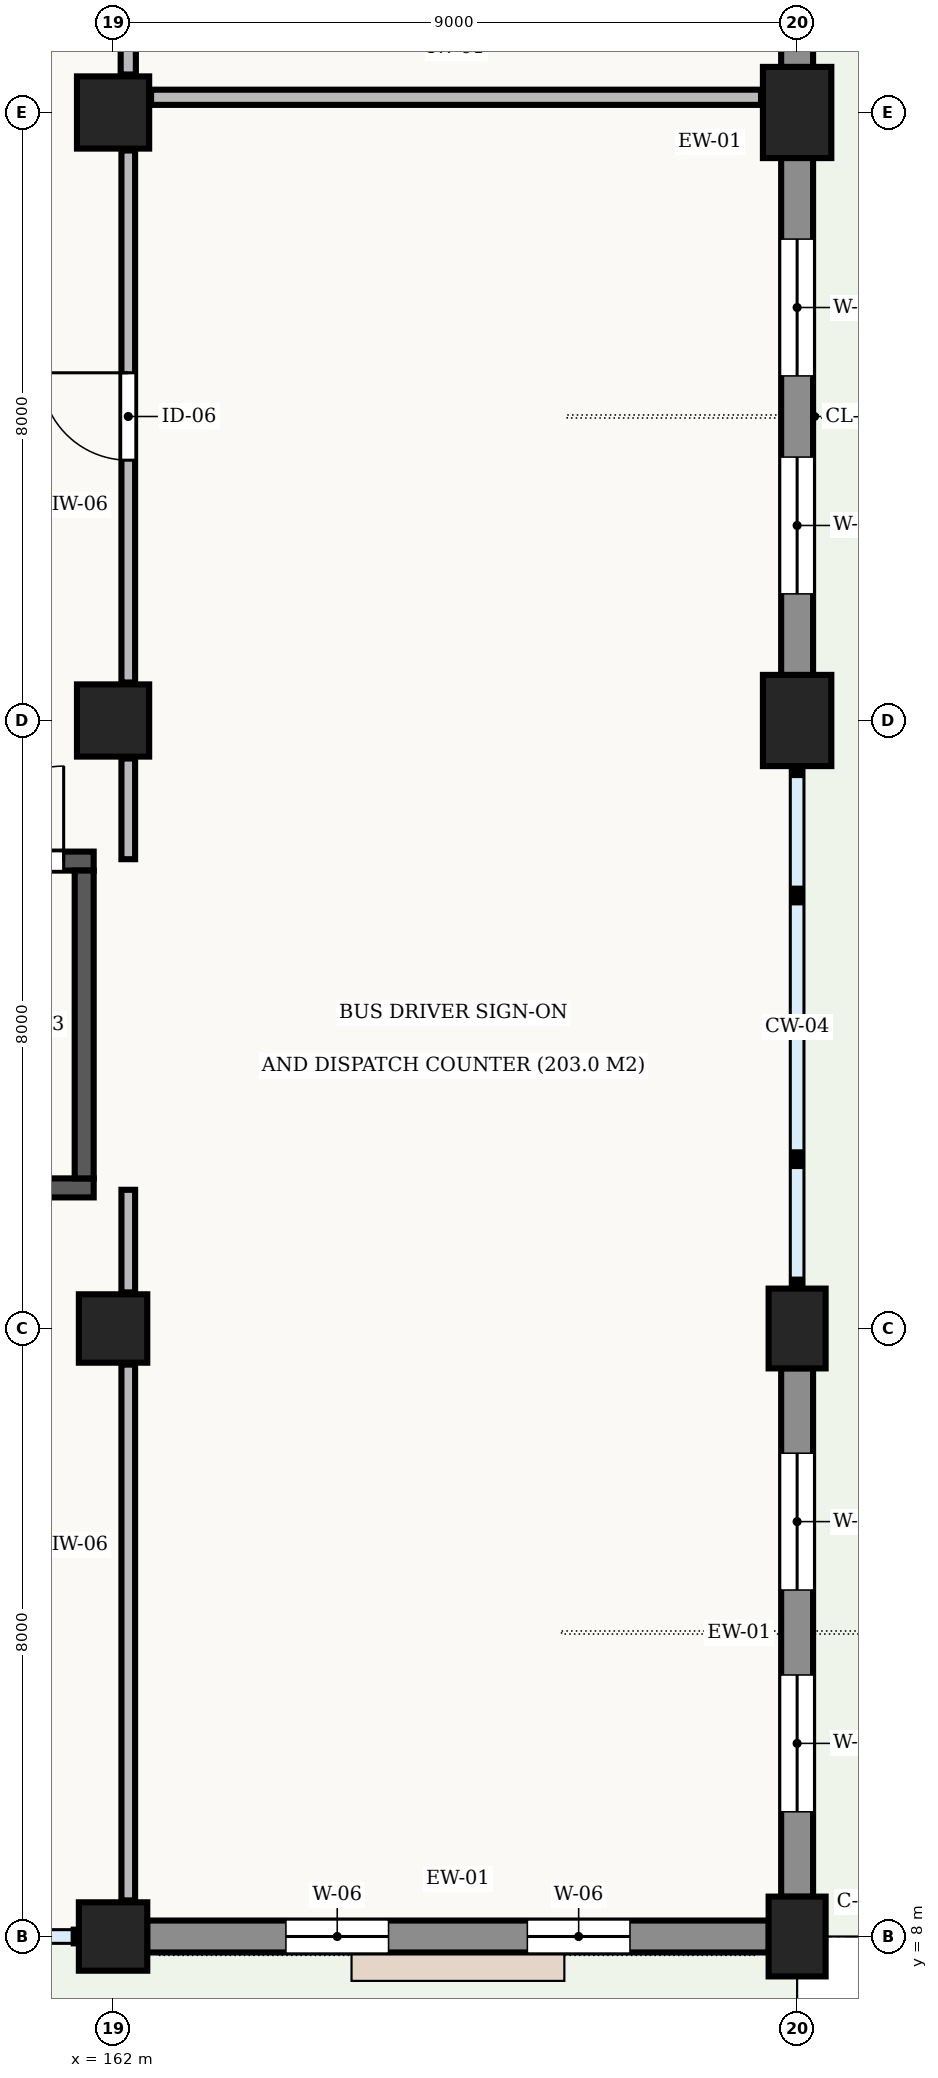
"""IFC4 building model, lengths in metres.
Left out: names, types, materials, properties, quantities, classifications, styles, units other than length and angle.
Written with IfcOpenShell. Run it as: python <this file> out.ifc"""

import sys

from ifc_helpers import new_model, si_unit, direction, frame, frame_2d, origin, origin_2d, place, context, subcontext, project, spatial, rectangle, extrude, element, fill, save


model = new_model("IFC4")
c1 = context("Model", 3, precision=1e-05, world=origin(), true_north=direction((0.0, 1.0)))
c2 = subcontext(c1, "Body", "Model", "MODEL_VIEW")
j1 = project(units=[si_unit("LENGTHUNIT", "METRE"), si_unit("PLANEANGLEUNIT", "RADIAN")], contexts=[c1])
p1 = place(None, origin())
s1 = spatial("IfcSite", under=j1, at=p1, CompositionType="ELEMENT")
p2 = place(p1, origin())
s2 = spatial("IfcBuilding", under=s1, at=p2, CompositionType="ELEMENT")
p3 = place(p2, origin())
s3 = spatial("IfcBuildingStorey", under=s2, at=p3, CompositionType="ELEMENT", Elevation=0.0)
for number, where, z_axis, x_axis in (
    (1, (162.0, 8.0, -0.42), (0.0, 0.0, 1.0), (1.0, 0.0, 0.0)),
    (2, (162.0, 16.0, -0.42), (0.0, 0.0, 1.0), (1.0, 0.0, 0.0)),
):
    element("IfcColumn", number, at=place(p3, frame(where, z_axis=z_axis, x_axis=x_axis)), inside=s3, PredefinedType="COLUMN", context=c2, shape_type="SweptSolid", body=[
        extrude(rectangle(XDim=0.9, YDim=0.9, at=origin_2d()), origin(), (0.0, 0.0, 1.0), 5.82),
    ])
for number, where, z_axis, x_axis in (
    (3, (162.0, 24.0, -0.42), (0.0, 0.0, 1.0), (1.0, 0.0, 0.0)),
    (4, (162.0, 32.0, -0.42), (0.0, 0.0, 1.0), (1.0, 0.0, 0.0)),
):
    element("IfcColumn", number, at=place(p3, frame(where, z_axis=z_axis, x_axis=x_axis)), inside=s3, PredefinedType="COLUMN", context=c2, shape_type="SweptSolid", body=[
        extrude(rectangle(XDim=0.95, YDim=0.95, at=origin_2d()), origin(), (0.0, 0.0, 1.0), 5.82),
    ])
for number, where, z_axis, x_axis in (
    (5, (171.0, 8.0, -0.42), (0.0, 0.0, 1.0), (1.0, 0.0, 0.0)),
    (6, (171.0, 16.0, -0.42), (0.0, 0.0, 1.0), (1.0, 0.0, 0.0)),
):
    element("IfcColumn", number, at=place(p3, frame(where, z_axis=z_axis, x_axis=x_axis)), inside=s3, PredefinedType="COLUMN", context=c2, shape_type="SweptSolid", body=[
        extrude(rectangle(XDim=0.75, YDim=1.05, at=origin_2d()), origin(), (0.0, 0.0, 1.0), 5.82),
    ])
for number, where, z_axis, x_axis in (
    (7, (171.0, 24.0, -0.42), (0.0, 0.0, 1.0), (1.0, 0.0, 0.0)),
    (8, (171.0, 32.0, -0.42), (0.0, 0.0, 1.0), (1.0, 0.0, 0.0)),
):
    element("IfcColumn", number, at=place(p3, frame(where, z_axis=z_axis, x_axis=x_axis)), inside=s3, PredefinedType="COLUMN", context=c2, shape_type="SweptSolid", body=[
        extrude(rectangle(XDim=0.9, YDim=1.2, at=origin_2d()), origin(), (0.0, 0.0, 1.0), 5.82),
    ])
p4 = place(p3, frame((171.0, 39.402, 0.0), z_axis=(0.0, 0.0, 1.0), x_axis=(0.0, -1.0, 0.0)))
e9 = element("IfcWall", 9, at=p4, inside=s3, PredefinedType="STANDARD", context=c2, shape_type="SweptSolid", body=[
    extrude(rectangle(XDim=6.804, YDim=0.42, at=frame_2d((3.402, 0.0))), origin(), (0.0, 0.0, 1.0), 4.38),
])
p5 = place(p4, frame((2.852, 0.0, 0.0)))
e10 = element("IfcOpeningElement", 10, at=p5, cuts=e9, PredefinedType="OPENING", context=c2, shape_type="SweptSolid", body=[
    extrude(rectangle(XDim=1.1, YDim=2.2, at=frame_2d((0.55, 1.1))), frame((0.0, 0.222, 0.0), z_axis=(0.0, -1.0, 0.0), x_axis=(1.0, 0.0, 0.0)), (0.0, 0.0, 1.0), 0.444),
])
p6 = place(p3, frame((171.0, 31.402, 0.0), z_axis=(0.0, 0.0, 1.0), x_axis=(0.0, -1.0, 0.0)))
e11 = element("IfcWall", 11, at=p6, inside=s3, PredefinedType="STANDARD", context=c2, shape_type="SweptSolid", body=[
    extrude(rectangle(XDim=6.804, YDim=0.42, at=frame_2d((3.402, 0.0))), origin(), (0.0, 0.0, 1.0), 4.38),
])
p7 = place(p6, frame((1.068, 0.0, 0.9)))
e12 = element("IfcOpeningElement", 12, at=p7, cuts=e11, PredefinedType="OPENING", context=c2, shape_type="SweptSolid", body=[
    extrude(rectangle(XDim=1.8, YDim=2.4, at=frame_2d((0.9, 1.2))), frame((0.0, 0.222, 0.0), z_axis=(0.0, -1.0, 0.0), x_axis=(1.0, 0.0, 0.0)), (0.0, 0.0, 1.0), 0.444),
])
p8 = place(p6, frame((3.936, 0.0, 0.9)))
e13 = element("IfcOpeningElement", 13, at=p8, cuts=e11, PredefinedType="OPENING", context=c2, shape_type="SweptSolid", body=[
    extrude(rectangle(XDim=1.8, YDim=2.4, at=frame_2d((0.9, 1.2))), frame((0.0, 0.222, 0.0), z_axis=(0.0, -1.0, 0.0), x_axis=(1.0, 0.0, 0.0)), (0.0, 0.0, 1.0), 0.444),
])
p9 = place(p3, frame((171.0, 15.477, 0.0), z_axis=(0.0, 0.0, 1.0), x_axis=(0.0, -1.0, 0.0)))
e14 = element("IfcWall", 14, at=p9, inside=s3, PredefinedType="STANDARD", context=c2, shape_type="SweptSolid", body=[
    extrude(rectangle(XDim=6.954, YDim=0.42, at=frame_2d((3.477, 0.0))), origin(), (0.0, 0.0, 1.0), 4.38),
])
p10 = place(p9, frame((1.118, 0.0, 0.9)))
e15 = element("IfcOpeningElement", 15, at=p10, cuts=e14, PredefinedType="OPENING", context=c2, shape_type="SweptSolid", body=[
    extrude(rectangle(XDim=1.8, YDim=2.4, at=frame_2d((0.9, 1.2))), frame((0.0, 0.222, 0.0), z_axis=(0.0, -1.0, 0.0), x_axis=(1.0, 0.0, 0.0)), (0.0, 0.0, 1.0), 0.444),
])
p11 = place(p9, frame((4.036, 0.0, 0.9)))
e16 = element("IfcOpeningElement", 16, at=p11, cuts=e14, PredefinedType="OPENING", context=c2, shape_type="SweptSolid", body=[
    extrude(rectangle(XDim=1.8, YDim=2.4, at=frame_2d((0.9, 1.2))), frame((0.0, 0.222, 0.0), z_axis=(0.0, -1.0, 0.0), x_axis=(1.0, 0.0, 0.0)), (0.0, 0.0, 1.0), 0.444),
])
p12 = place(p3, frame((170.627, 8.0, 0.0), z_axis=(0.0, 0.0, 1.0), x_axis=(-1.0, 0.0, 0.0)))
e17 = element("IfcWall", 17, at=p12, inside=s3, PredefinedType="STANDARD", context=c2, shape_type="SweptSolid", body=[
    extrude(rectangle(XDim=8.179, YDim=0.42, at=frame_2d((4.089, 0.0))), origin(), (0.0, 0.0, 1.0), 4.38),
])
p13 = place(p12, frame((1.826, 0.0, 0.9)))
e18 = element("IfcOpeningElement", 18, at=p13, cuts=e17, PredefinedType="OPENING", context=c2, shape_type="SweptSolid", body=[
    extrude(rectangle(XDim=1.35, YDim=2.0, at=frame_2d((0.675, 1.0))), frame((0.0, 0.222, 0.0), z_axis=(0.0, -1.0, 0.0), x_axis=(1.0, 0.0, 0.0)), (0.0, 0.0, 1.0), 0.444),
])
p14 = place(p12, frame((5.003, 0.0, 0.9)))
e19 = element("IfcOpeningElement", 19, at=p14, cuts=e17, PredefinedType="OPENING", context=c2, shape_type="SweptSolid", body=[
    extrude(rectangle(XDim=1.35, YDim=2.0, at=frame_2d((0.675, 1.0))), frame((0.0, 0.222, 0.0), z_axis=(0.0, -1.0, 0.0), x_axis=(1.0, 0.0, 0.0)), (0.0, 0.0, 1.0), 0.444),
])
p15 = place(p3, frame((153.255, 17.85, 0.0), z_axis=(0.0, 0.0, 1.0), x_axis=(1.0, 0.0, 0.0)))
e20 = element("IfcWall", 20, at=p15, inside=s3, PredefinedType="SHEAR", context=c2, shape_type="SweptSolid", body=[
    extrude(rectangle(XDim=8.49, YDim=0.25, at=frame_2d((4.245, 0.0))), origin(), (0.0, 0.0, 1.0), 5.05),
])
p16 = place(p3, frame((161.745, 22.15, 0.0), z_axis=(0.0, 0.0, 1.0), x_axis=(-1.0, 0.0, 0.0)))
e21 = element("IfcWall", 21, at=p16, inside=s3, PredefinedType="SHEAR", context=c2, shape_type="SweptSolid", body=[
    extrude(rectangle(XDim=8.49, YDim=0.25, at=frame_2d((4.245, 0.0))), origin(), (0.0, 0.0, 1.0), 5.05),
])
p17 = place(p16, frame((0.395, 0.0, 0.0)))
e22 = element("IfcOpeningElement", 22, at=p17, cuts=e21, PredefinedType="OPENING", context=c2, shape_type="SweptSolid", body=[
    extrude(rectangle(XDim=1.25, YDim=2.15, at=frame_2d((0.625, 1.075))), frame((0.0, 0.137, 0.0), z_axis=(0.0, -1.0, 0.0), x_axis=(1.0, 0.0, 0.0)), (0.0, 0.0, 1.0), 0.274),
])
p18 = place(p3, frame((161.62, 17.975, 0.0), z_axis=(0.0, 0.0, 1.0), x_axis=(0.0, 1.0, 0.0)))
e23 = element("IfcWall", 23, at=p18, inside=s3, PredefinedType="SHEAR", context=c2, shape_type="SweptSolid", body=[
    extrude(rectangle(XDim=4.05, YDim=0.25, at=frame_2d((2.025, 0.0))), origin(), (0.0, 0.0, 1.0), 5.05),
])
p19 = place(p3, frame((162.5, 32.2, 0.0), z_axis=(0.0, 0.0, 1.0), x_axis=(1.0, 0.0, 0.0)))
e24 = element("IfcWall", 24, at=p19, inside=s3, PredefinedType="STANDARD", context=c2, shape_type="SweptSolid", body=[
    extrude(rectangle(XDim=8.025, YDim=0.2, at=frame_2d((4.012, 0.0))), origin(), (0.0, 0.0, 1.0), 4.18),
])
p20 = place(p3, frame((162.2, 32.5, 0.0), z_axis=(0.0, 0.0, 1.0), x_axis=(0.0, 1.0, 0.0)))
e25 = element("IfcWall", 25, at=p20, inside=s3, PredefinedType="STANDARD", context=c2, shape_type="SweptSolid", body=[
    extrude(rectangle(XDim=7.0, YDim=0.2, at=frame_2d((3.5, 0.0))), origin(), (0.0, 0.0, 1.0), 4.23),
])
p21 = place(p3, frame((162.2, 8.475, 0.0), z_axis=(0.0, 0.0, 1.0), x_axis=(0.0, 1.0, 0.0)))
e26 = element("IfcWall", 26, at=p21, inside=s3, PredefinedType="STANDARD", context=c2, shape_type="SweptSolid", body=[
    extrude(rectangle(XDim=7.05, YDim=0.18, at=frame_2d((3.525, 0.0))), origin(), (0.0, 0.0, 1.0), 4.33),
])
p22 = place(p3, frame((162.2, 16.475, 0.0), z_axis=(0.0, 0.0, 1.0), x_axis=(0.0, 1.0, 0.0)))
e27 = element("IfcWall", 27, at=p22, inside=s3, PredefinedType="STANDARD", context=c2, shape_type="SweptSolid", body=[
    extrude(rectangle(XDim=1.35, YDim=0.18, at=frame_2d((0.675, 0.0))), origin(), (0.0, 0.0, 1.0), 4.33),
])
p23 = place(p3, frame((162.2, 22.175, 0.0), z_axis=(0.0, 0.0, 1.0), x_axis=(0.0, 1.0, 0.0)))
e28 = element("IfcWall", 28, at=p23, inside=s3, PredefinedType="STANDARD", context=c2, shape_type="SweptSolid", body=[
    extrude(rectangle(XDim=1.325, YDim=0.18, at=frame_2d((0.663, 0.0))), origin(), (0.0, 0.0, 1.0), 4.33),
])
p24 = place(p3, frame((162.2, 24.5, 0.0), z_axis=(0.0, 0.0, 1.0), x_axis=(0.0, 1.0, 0.0)))
e29 = element("IfcWall", 29, at=p24, inside=s3, PredefinedType="STANDARD", context=c2, shape_type="SweptSolid", body=[
    extrude(rectangle(XDim=7.0, YDim=0.18, at=frame_2d((3.5, 0.0))), origin(), (0.0, 0.0, 1.0), 4.33),
])
p25 = place(p24, frame((2.925, 0.0, 0.0)))
e30 = element("IfcOpeningElement", 30, at=p25, cuts=e29, PredefinedType="OPENING", context=c2, shape_type="SweptSolid", body=[
    extrude(rectangle(XDim=1.15, YDim=2.15, at=frame_2d((0.575, 1.075))), frame((0.0, 0.102, 0.0), z_axis=(0.0, -1.0, 0.0), x_axis=(1.0, 0.0, 0.0)), (0.0, 0.0, 1.0), 0.204),
])
p26 = place(p7, origin())
e31 = element("IfcWindow", 31, at=p26, inside=s3, PartitioningType="SINGLE_PANEL", PredefinedType="WINDOW", context=c2, shape_type="SweptSolid", body=[
    extrude(rectangle(XDim=1.8, YDim=2.4, at=frame_2d((0.9, 1.2))), frame((0.0, 0.03, 0.0), z_axis=(0.0, -1.0, 0.0), x_axis=(1.0, 0.0, 0.0)), (0.0, 0.0, 1.0), 0.06),
])
fill(e12, e31)
p27 = place(p8, origin())
e32 = element("IfcWindow", 32, at=p27, inside=s3, PartitioningType="SINGLE_PANEL", PredefinedType="WINDOW", context=c2, shape_type="SweptSolid", body=[
    extrude(rectangle(XDim=1.8, YDim=2.4, at=frame_2d((0.9, 1.2))), frame((0.0, 0.03, 0.0), z_axis=(0.0, -1.0, 0.0), x_axis=(1.0, 0.0, 0.0)), (0.0, 0.0, 1.0), 0.06),
])
fill(e13, e32)
p28 = place(p10, origin())
e33 = element("IfcWindow", 33, at=p28, inside=s3, PartitioningType="SINGLE_PANEL", PredefinedType="WINDOW", context=c2, shape_type="SweptSolid", body=[
    extrude(rectangle(XDim=1.8, YDim=2.4, at=frame_2d((0.9, 1.2))), frame((0.0, 0.03, 0.0), z_axis=(0.0, -1.0, 0.0), x_axis=(1.0, 0.0, 0.0)), (0.0, 0.0, 1.0), 0.06),
])
fill(e15, e33)
p29 = place(p11, origin())
e34 = element("IfcWindow", 34, at=p29, inside=s3, PartitioningType="SINGLE_PANEL", PredefinedType="WINDOW", context=c2, shape_type="SweptSolid", body=[
    extrude(rectangle(XDim=1.8, YDim=2.4, at=frame_2d((0.9, 1.2))), frame((0.0, 0.03, 0.0), z_axis=(0.0, -1.0, 0.0), x_axis=(1.0, 0.0, 0.0)), (0.0, 0.0, 1.0), 0.06),
])
fill(e16, e34)
p30 = place(p13, origin())
e35 = element("IfcWindow", 35, at=p30, inside=s3, PartitioningType="SINGLE_PANEL", PredefinedType="WINDOW", context=c2, shape_type="SweptSolid", body=[
    extrude(rectangle(XDim=1.35, YDim=2.0, at=frame_2d((0.675, 1.0))), frame((0.0, 0.03, 0.0), z_axis=(0.0, -1.0, 0.0), x_axis=(1.0, 0.0, 0.0)), (0.0, 0.0, 1.0), 0.06),
])
fill(e18, e35)
p31 = place(p14, origin())
e36 = element("IfcWindow", 36, at=p31, inside=s3, PartitioningType="SINGLE_PANEL", PredefinedType="WINDOW", context=c2, shape_type="SweptSolid", body=[
    extrude(rectangle(XDim=1.35, YDim=2.0, at=frame_2d((0.675, 1.0))), frame((0.0, 0.03, 0.0), z_axis=(0.0, -1.0, 0.0), x_axis=(1.0, 0.0, 0.0)), (0.0, 0.0, 1.0), 0.06),
])
fill(e19, e36)
p32 = place(p17, frame((1.25, 0.0, 0.0), z_axis=(0.0, 0.0, 1.0), x_axis=(-1.0, 0.0, 0.0)))
e37 = element("IfcDoor", 37, at=p32, inside=s3, OperationType="SINGLE_SWING_RIGHT", PredefinedType="DOOR", context=c2, shape_type="SweptSolid", body=[
    extrude(rectangle(XDim=1.25, YDim=2.15, at=frame_2d((0.625, 1.075))), frame((0.0, 0.025, 0.0), z_axis=(0.0, -1.0, 0.0), x_axis=(1.0, 0.0, 0.0)), (0.0, 0.0, 1.0), 0.05),
])
fill(e22, e37)
p33 = place(p25, origin())
e38 = element("IfcDoor", 38, at=p33, inside=s3, OperationType="SINGLE_SWING_RIGHT", PredefinedType="DOOR", context=c2, shape_type="SweptSolid", body=[
    extrude(rectangle(XDim=1.15, YDim=2.15, at=frame_2d((0.575, 1.075))), frame((0.0, 0.025, 0.0), z_axis=(0.0, -1.0, 0.0), x_axis=(1.0, 0.0, 0.0)), (0.0, 0.0, 1.0), 0.05),
])
fill(e30, e38)
save(model, sys.argv[1])
